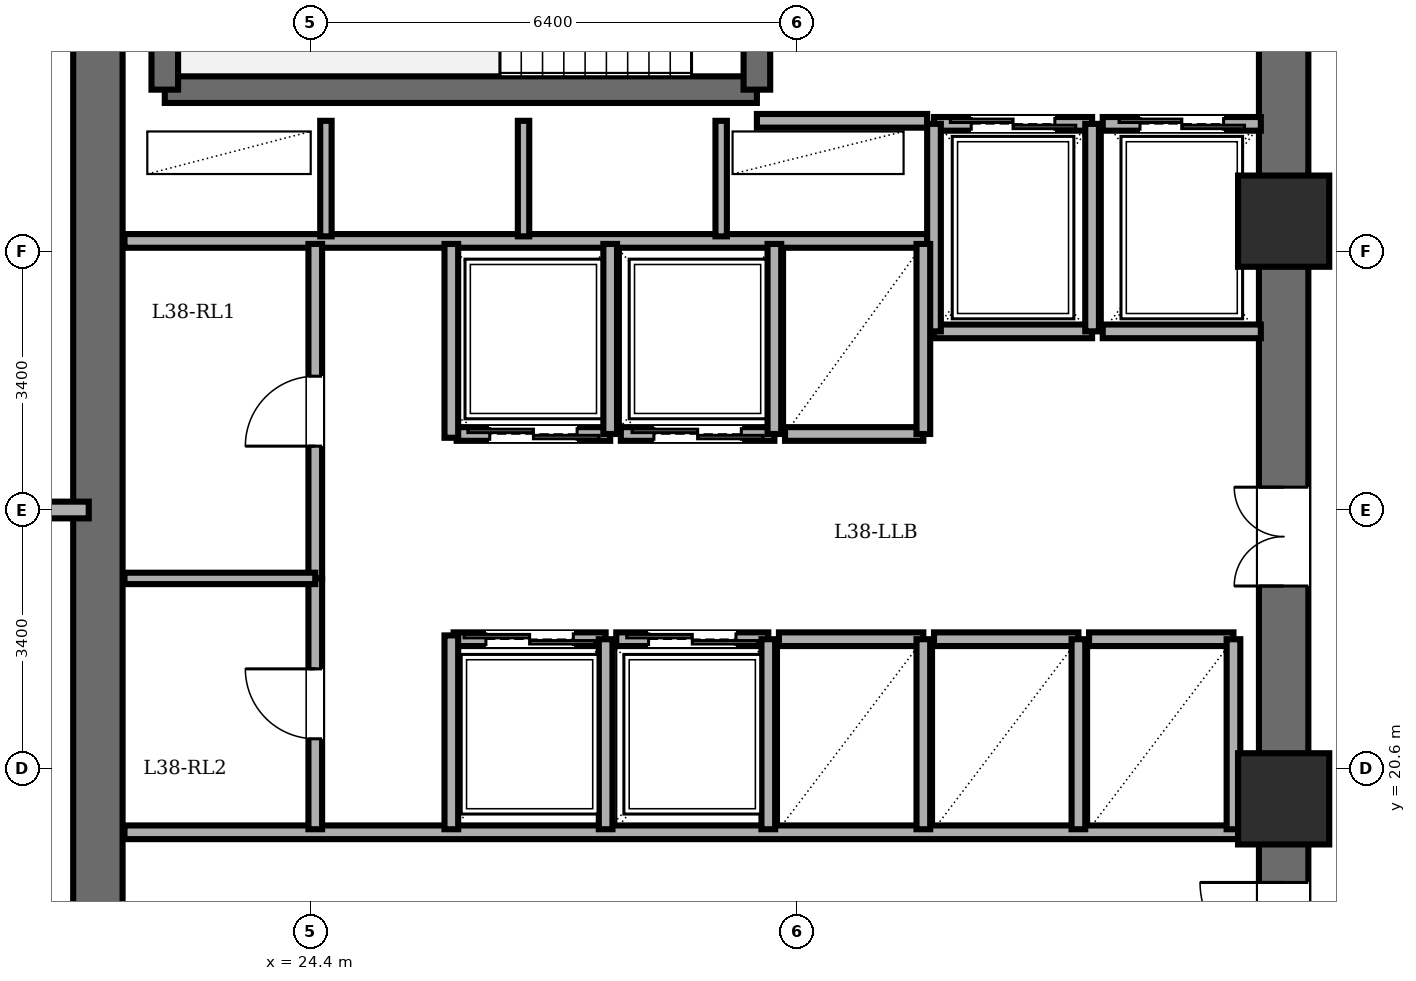
"""IFC4 building model, lengths in metres.
Left out: names, types, materials, properties, quantities, classifications, styles, units other than length and angle.
Written with IfcOpenShell. Run it as: python <this file> out.ifc"""

import sys

from ifc_helpers import new_model, si_unit, direction, frame, frame_2d, origin, origin_2d, place, context, subcontext, project, spatial, rectangle, extrude, element, fill, save


model = new_model("IFC4")
c1 = context("Model", 3, precision=1e-05, world=origin(), true_north=direction((0.0, 1.0)))
c2 = subcontext(c1, "Body", "Model", "MODEL_VIEW")
j1 = project(units=[si_unit("LENGTHUNIT", "METRE"), si_unit("PLANEANGLEUNIT", "RADIAN")], contexts=[c1])
p1 = place(None, origin())
s1 = spatial("IfcSite", under=j1, at=p1, CompositionType="ELEMENT")
p2 = place(p1, origin())
s2 = spatial("IfcBuilding", under=s1, at=p2, CompositionType="ELEMENT")
p3 = place(p2, frame((0.0, 0.0, 147.4)))
s3 = spatial("IfcBuildingStorey", under=s2, at=p3, CompositionType="ELEMENT", Elevation=147.4)
for number, where, z_axis, x_axis in (
    (1, (37.2, 20.2, 0.0), (0.0, 0.0, 1.0), (1.0, 0.0, 0.0)),
    (2, (37.2, 27.8, 0.0), (0.0, 0.0, 1.0), (1.0, 0.0, 0.0)),
):
    element("IfcColumn", number, at=place(p3, frame(where, z_axis=z_axis, x_axis=x_axis)), inside=s3, PredefinedType="COLUMN", context=c2, shape_type="SweptSolid", body=[
        extrude(rectangle(XDim=1.2, YDim=1.2, at=origin_2d()), origin(), (0.0, 0.0, 1.0), 3.6),
    ])
p4 = place(p3, frame((21.6, 14.4, 0.0), z_axis=(0.0, 0.0, 1.0), x_axis=(0.0, 1.0, 0.0)))
e3 = element("IfcWall", 3, at=p4, inside=s3, PredefinedType="SHEAR", context=c2, shape_type="SweptSolid", body=[
    extrude(rectangle(XDim=19.2, YDim=0.65, at=frame_2d((9.6, 0.0))), origin(), (0.0, 0.0, 1.0), 3.4),
])
p5 = place(p3, frame((37.2, 14.4, 0.0), z_axis=(0.0, 0.0, 1.0), x_axis=(0.0, 1.0, 0.0)))
e4 = element("IfcWall", 4, at=p5, inside=s3, PredefinedType="SHEAR", context=c2, shape_type="SweptSolid", body=[
    extrude(rectangle(XDim=19.2, YDim=0.65, at=frame_2d((9.6, 0.0))), origin(), (0.0, 0.0, 1.0), 3.4),
])
p6 = place(p5, frame((15.8, 0.0, 0.0)))
e5 = element("IfcOpeningElement", 5, at=p6, cuts=e4, PredefinedType="OPENING", context=c2, shape_type="SweptSolid", body=[
    extrude(rectangle(XDim=1.15, YDim=2.15, at=frame_2d((0.575, 1.075))), frame((0.0, 0.335, 0.0), z_axis=(0.0, -1.0, 0.0), x_axis=(1.0, 0.0, 0.0)), (0.0, 0.0, 1.0), 0.67),
])
p7 = place(p5, frame((3.6, 0.0, 0.0)))
e6 = element("IfcOpeningElement", 6, at=p7, cuts=e4, PredefinedType="OPENING", context=c2, shape_type="SweptSolid", body=[
    extrude(rectangle(XDim=1.1, YDim=2.15, at=frame_2d((0.55, 1.075))), frame((0.0, 0.335, 0.0), z_axis=(0.0, -1.0, 0.0), x_axis=(1.0, 0.0, 0.0)), (0.0, 0.0, 1.0), 0.67),
])
p8 = place(p5, frame((8.6, 0.0, 0.0)))
e7 = element("IfcOpeningElement", 7, at=p8, cuts=e4, PredefinedType="OPENING", context=c2, shape_type="SweptSolid", body=[
    extrude(rectangle(XDim=1.3, YDim=2.2, at=frame_2d((0.65, 1.1))), frame((0.0, 0.335, 0.0), z_axis=(0.0, -1.0, 0.0), x_axis=(1.0, 0.0, 0.0)), (0.0, 0.0, 1.0), 0.67),
])
p9 = place(p3, frame((22.48, 29.53, 0.0), z_axis=(0.0, 0.0, 1.0), x_axis=(1.0, 0.0, 0.0)))
e8 = element("IfcWall", 8, at=p9, inside=s3, PredefinedType="SOLIDWALL", context=c2, shape_type="SweptSolid", body=[
    extrude(rectangle(XDim=7.79, YDim=0.35, at=frame_2d((3.895, 0.0))), origin(), (0.0, 0.0, 1.0), 3.4),
])
p10 = place(p3, frame((22.48, 29.53, 0.0), z_axis=(0.0, 0.0, 1.0), x_axis=(0.0, 1.0, 0.0)))
e9 = element("IfcWall", 9, at=p10, inside=s3, PredefinedType="SOLIDWALL", context=c2, shape_type="SweptSolid", body=[
    extrude(rectangle(XDim=3.58, YDim=0.35, at=frame_2d((1.79, 0.0))), origin(), (0.0, 0.0, 1.0), 3.4),
])
p11 = place(p3, frame((30.27, 29.53, 0.0), z_axis=(0.0, 0.0, 1.0), x_axis=(0.0, 1.0, 0.0)))
e10 = element("IfcWall", 10, at=p11, inside=s3, PredefinedType="SOLIDWALL", context=c2, shape_type="SweptSolid", body=[
    extrude(rectangle(XDim=3.58, YDim=0.35, at=frame_2d((1.79, 0.0))), origin(), (0.0, 0.0, 1.0), 3.4),
])
p12 = place(p11, frame((1.25, 0.0, 0.0)))
e11 = element("IfcOpeningElement", 11, at=p12, cuts=e10, PredefinedType="OPENING", context=c2, shape_type="SweptSolid", body=[
    extrude(rectangle(XDim=1.1, YDim=2.15, at=frame_2d((0.55, 1.075))), frame((0.0, 0.185, 0.0), z_axis=(0.0, -1.0, 0.0), x_axis=(1.0, 0.0, 0.0)), (0.0, 0.0, 1.0), 0.37),
])
p13 = place(p3, frame((30.27, 29.12, 0.0), z_axis=(0.0, 0.0, 1.0), x_axis=(1.0, 0.0, 0.0)))
e12 = element("IfcWall", 12, at=p13, inside=s3, PredefinedType="PARTITIONING", context=c2, shape_type="SweptSolid", body=[
    extrude(rectangle(XDim=2.24, YDim=0.18, at=frame_2d((1.12, 0.0))), origin(), (0.0, 0.0, 1.0), 3.4),
])
p14 = place(p3, frame((21.95, 27.54, 0.0), z_axis=(0.0, 0.0, 1.0), x_axis=(1.0, 0.0, 0.0)))
e13 = element("IfcWall", 13, at=p14, inside=s3, PredefinedType="PARTITIONING", context=c2, shape_type="SweptSolid", body=[
    extrude(rectangle(XDim=10.56, YDim=0.18, at=frame_2d((5.28, 0.0))), origin(), (0.0, 0.0, 1.0), 3.4),
])
for number, where, z_axis, x_axis in (
    (14, (24.6, 27.6, 0.0), (0.0, 0.0, 1.0), (0.0, 1.0, 0.0)),
    (15, (27.2, 27.6, 0.0), (0.0, 0.0, 1.0), (0.0, 1.0, 0.0)),
    (16, (29.8, 27.6, 0.0), (0.0, 0.0, 1.0), (0.0, 1.0, 0.0)),
):
    element("IfcWall", number, at=place(p3, frame(where, z_axis=z_axis, x_axis=x_axis)), inside=s3, PredefinedType="PARTITIONING", context=c2, shape_type="SweptSolid", body=[
        extrude(rectangle(XDim=1.52, YDim=0.15, at=frame_2d((0.76, 0.0))), origin(), (0.0, 0.0, 1.0), 3.4),
    ])
p15 = place(p3, frame((21.95, 19.76, 0.0), z_axis=(0.0, 0.0, 1.0), x_axis=(1.0, 0.0, 0.0)))
e17 = element("IfcWall", 17, at=p15, inside=s3, PredefinedType="PARTITIONING", context=c2, shape_type="SweptSolid", body=[
    extrude(rectangle(XDim=14.87, YDim=0.18, at=frame_2d((7.435, 0.0))), origin(), (0.0, 0.0, 1.0), 3.4),
])
p16 = place(p3, frame((32.6, 29.08, 0.0), z_axis=(0.0, 0.0, 1.0), x_axis=(1.0, 0.0, 0.0)))
e18 = element("IfcWall", 18, at=p16, inside=s3, PredefinedType="PARTITIONING", context=c2, shape_type="SweptSolid", body=[
    extrude(rectangle(XDim=2.08, YDim=0.18, at=frame_2d((1.04, 0.0))), origin(), (0.0, 0.0, 1.0), 3.4),
])
p17 = place(p16, frame((0.49, 0.0, 0.0)))
e19 = element("IfcOpeningElement", 19, at=p17, cuts=e18, PredefinedType="OPENING", context=c2, shape_type="SweptSolid", body=[
    extrude(rectangle(XDim=1.1, YDim=2.2, at=frame_2d((0.55, 1.1))), frame((0.0, 0.1, 0.0), z_axis=(0.0, -1.0, 0.0), x_axis=(1.0, 0.0, 0.0)), (0.0, 0.0, 1.0), 0.2),
])
p18 = place(p3, frame((34.68, 26.35, 0.0), z_axis=(0.0, 0.0, 1.0), x_axis=(-1.0, 0.0, 0.0)))
e20 = element("IfcWall", 20, at=p18, inside=s3, PredefinedType="PARTITIONING", context=c2, shape_type="SweptSolid", body=[
    extrude(rectangle(XDim=2.08, YDim=0.18, at=frame_2d((1.04, 0.0))), origin(), (0.0, 0.0, 1.0), 3.4),
])
for number, where, z_axis, x_axis in (
    (21, (34.68, 26.35, 0.0), (0.0, 0.0, 1.0), (0.0, 1.0, 0.0)),
    (22, (32.6, 29.08, 0.0), (0.0, 0.0, 1.0), (0.0, -1.0, 0.0)),
):
    element("IfcWall", number, at=place(p3, frame(where, z_axis=z_axis, x_axis=x_axis)), inside=s3, PredefinedType="PARTITIONING", context=c2, shape_type="SweptSolid", body=[
        extrude(rectangle(XDim=2.73, YDim=0.18, at=frame_2d((1.365, 0.0))), origin(), (0.0, 0.0, 1.0), 3.4),
    ])
p19 = place(p3, frame((34.82, 29.08, 0.0), z_axis=(0.0, 0.0, 1.0), x_axis=(1.0, 0.0, 0.0)))
e23 = element("IfcWall", 23, at=p19, inside=s3, PredefinedType="PARTITIONING", context=c2, shape_type="SweptSolid", body=[
    extrude(rectangle(XDim=2.08, YDim=0.18, at=frame_2d((1.04, 0.0))), origin(), (0.0, 0.0, 1.0), 3.4),
])
p20 = place(p19, frame((0.49, 0.0, 0.0)))
e24 = element("IfcOpeningElement", 24, at=p20, cuts=e23, PredefinedType="OPENING", context=c2, shape_type="SweptSolid", body=[
    extrude(rectangle(XDim=1.1, YDim=2.2, at=frame_2d((0.55, 1.1))), frame((0.0, 0.1, 0.0), z_axis=(0.0, -1.0, 0.0), x_axis=(1.0, 0.0, 0.0)), (0.0, 0.0, 1.0), 0.2),
])
p21 = place(p3, frame((36.9, 26.35, 0.0), z_axis=(0.0, 0.0, 1.0), x_axis=(-1.0, 0.0, 0.0)))
e25 = element("IfcWall", 25, at=p21, inside=s3, PredefinedType="PARTITIONING", context=c2, shape_type="SweptSolid", body=[
    extrude(rectangle(XDim=2.08, YDim=0.18, at=frame_2d((1.04, 0.0))), origin(), (0.0, 0.0, 1.0), 3.4),
])
p22 = place(p3, frame((28.34, 25.0, 0.0), z_axis=(0.0, 0.0, 1.0), x_axis=(-1.0, 0.0, 0.0)))
e26 = element("IfcWall", 26, at=p22, inside=s3, PredefinedType="PARTITIONING", context=c2, shape_type="SweptSolid", body=[
    extrude(rectangle(XDim=2.02, YDim=0.18, at=frame_2d((1.01, 0.0))), origin(), (0.0, 0.0, 1.0), 3.4),
])
p23 = place(p22, frame((0.435, 0.0, 0.0)))
e27 = element("IfcOpeningElement", 27, at=p23, cuts=e26, PredefinedType="OPENING", context=c2, shape_type="SweptSolid", body=[
    extrude(rectangle(XDim=1.15, YDim=2.2, at=frame_2d((0.575, 1.1))), frame((0.0, 0.1, 0.0), z_axis=(0.0, -1.0, 0.0), x_axis=(1.0, 0.0, 0.0)), (0.0, 0.0, 1.0), 0.2),
])
p24 = place(p3, frame((28.34, 25.0, 0.0), z_axis=(0.0, 0.0, 1.0), x_axis=(0.0, 1.0, 0.0)))
e28 = element("IfcWall", 28, at=p24, inside=s3, PredefinedType="PARTITIONING", context=c2, shape_type="SweptSolid", body=[
    extrude(rectangle(XDim=2.5, YDim=0.18, at=frame_2d((1.25, 0.0))), origin(), (0.0, 0.0, 1.0), 3.4),
])
p25 = place(p3, frame((30.5, 25.0, 0.0), z_axis=(0.0, 0.0, 1.0), x_axis=(-1.0, 0.0, 0.0)))
e29 = element("IfcWall", 29, at=p25, inside=s3, PredefinedType="PARTITIONING", context=c2, shape_type="SweptSolid", body=[
    extrude(rectangle(XDim=2.02, YDim=0.18, at=frame_2d((1.01, 0.0))), origin(), (0.0, 0.0, 1.0), 3.4),
])
p26 = place(p25, frame((0.435, 0.0, 0.0)))
e30 = element("IfcOpeningElement", 30, at=p26, cuts=e29, PredefinedType="OPENING", context=c2, shape_type="SweptSolid", body=[
    extrude(rectangle(XDim=1.15, YDim=2.2, at=frame_2d((0.575, 1.1))), frame((0.0, 0.1, 0.0), z_axis=(0.0, -1.0, 0.0), x_axis=(1.0, 0.0, 0.0)), (0.0, 0.0, 1.0), 0.2),
])
p27 = place(p3, frame((30.5, 25.0, 0.0), z_axis=(0.0, 0.0, 1.0), x_axis=(0.0, 1.0, 0.0)))
e31 = element("IfcWall", 31, at=p27, inside=s3, PredefinedType="PARTITIONING", context=c2, shape_type="SweptSolid", body=[
    extrude(rectangle(XDim=2.5, YDim=0.18, at=frame_2d((1.25, 0.0))), origin(), (0.0, 0.0, 1.0), 3.4),
])
p28 = place(p3, frame((26.28, 22.3, 0.0), z_axis=(0.0, 0.0, 1.0), x_axis=(1.0, 0.0, 0.0)))
e32 = element("IfcWall", 32, at=p28, inside=s3, PredefinedType="PARTITIONING", context=c2, shape_type="SweptSolid", body=[
    extrude(rectangle(XDim=2.0, YDim=0.18, at=frame_2d((1.0, 0.0))), origin(), (0.0, 0.0, 1.0), 3.4),
])
p29 = place(p28, frame((0.425, 0.0, 0.0)))
e33 = element("IfcOpeningElement", 33, at=p29, cuts=e32, PredefinedType="OPENING", context=c2, shape_type="SweptSolid", body=[
    extrude(rectangle(XDim=1.15, YDim=2.2, at=frame_2d((0.575, 1.1))), frame((0.0, 0.1, 0.0), z_axis=(0.0, -1.0, 0.0), x_axis=(1.0, 0.0, 0.0)), (0.0, 0.0, 1.0), 0.2),
])
p30 = place(p3, frame((28.28, 19.8, 0.0), z_axis=(0.0, 0.0, 1.0), x_axis=(0.0, 1.0, 0.0)))
e34 = element("IfcWall", 34, at=p30, inside=s3, PredefinedType="PARTITIONING", context=c2, shape_type="SweptSolid", body=[
    extrude(rectangle(XDim=2.5, YDim=0.18, at=frame_2d((1.25, 0.0))), origin(), (0.0, 0.0, 1.0), 3.4),
])
p31 = place(p3, frame((28.42, 22.3, 0.0), z_axis=(0.0, 0.0, 1.0), x_axis=(1.0, 0.0, 0.0)))
e35 = element("IfcWall", 35, at=p31, inside=s3, PredefinedType="PARTITIONING", context=c2, shape_type="SweptSolid", body=[
    extrude(rectangle(XDim=2.0, YDim=0.18, at=frame_2d((1.0, 0.0))), origin(), (0.0, 0.0, 1.0), 3.4),
])
p32 = place(p31, frame((0.425, 0.0, 0.0)))
e36 = element("IfcOpeningElement", 36, at=p32, cuts=e35, PredefinedType="OPENING", context=c2, shape_type="SweptSolid", body=[
    extrude(rectangle(XDim=1.15, YDim=2.2, at=frame_2d((0.575, 1.1))), frame((0.0, 0.1, 0.0), z_axis=(0.0, -1.0, 0.0), x_axis=(1.0, 0.0, 0.0)), (0.0, 0.0, 1.0), 0.2),
])
p33 = place(p3, frame((30.42, 19.8, 0.0), z_axis=(0.0, 0.0, 1.0), x_axis=(0.0, 1.0, 0.0)))
e37 = element("IfcWall", 37, at=p33, inside=s3, PredefinedType="PARTITIONING", context=c2, shape_type="SweptSolid", body=[
    extrude(rectangle(XDim=2.5, YDim=0.18, at=frame_2d((1.25, 0.0))), origin(), (0.0, 0.0, 1.0), 3.4),
])
p34 = place(p3, frame((32.46, 25.0, 0.0), z_axis=(0.0, 0.0, 1.0), x_axis=(-1.0, 0.0, 0.0)))
e38 = element("IfcWall", 38, at=p34, inside=s3, PredefinedType="PARTITIONING", context=c2, shape_type="SweptSolid", body=[
    extrude(rectangle(XDim=1.82, YDim=0.18, at=frame_2d((0.91, 0.0))), origin(), (0.0, 0.0, 1.0), 3.4),
])
p35 = place(p3, frame((32.46, 25.0, 0.0), z_axis=(0.0, 0.0, 1.0), x_axis=(0.0, 1.0, 0.0)))
e39 = element("IfcWall", 39, at=p35, inside=s3, PredefinedType="PARTITIONING", context=c2, shape_type="SweptSolid", body=[
    extrude(rectangle(XDim=2.5, YDim=0.18, at=frame_2d((1.25, 0.0))), origin(), (0.0, 0.0, 1.0), 3.4),
])
p36 = place(p3, frame((30.56, 22.3, 0.0), z_axis=(0.0, 0.0, 1.0), x_axis=(1.0, 0.0, 0.0)))
e40 = element("IfcWall", 40, at=p36, inside=s3, PredefinedType="PARTITIONING", context=c2, shape_type="SweptSolid", body=[
    extrude(rectangle(XDim=1.9, YDim=0.18, at=frame_2d((0.95, 0.0))), origin(), (0.0, 0.0, 1.0), 3.4),
])
p37 = place(p3, frame((32.46, 19.8, 0.0), z_axis=(0.0, 0.0, 1.0), x_axis=(0.0, 1.0, 0.0)))
e41 = element("IfcWall", 41, at=p37, inside=s3, PredefinedType="PARTITIONING", context=c2, shape_type="SweptSolid", body=[
    extrude(rectangle(XDim=2.5, YDim=0.18, at=frame_2d((1.25, 0.0))), origin(), (0.0, 0.0, 1.0), 3.4),
])
p38 = place(p3, frame((32.6, 22.3, 0.0), z_axis=(0.0, 0.0, 1.0), x_axis=(1.0, 0.0, 0.0)))
e42 = element("IfcWall", 42, at=p38, inside=s3, PredefinedType="PARTITIONING", context=c2, shape_type="SweptSolid", body=[
    extrude(rectangle(XDim=1.9, YDim=0.18, at=frame_2d((0.95, 0.0))), origin(), (0.0, 0.0, 1.0), 3.4),
])
p39 = place(p3, frame((34.5, 19.8, 0.0), z_axis=(0.0, 0.0, 1.0), x_axis=(0.0, 1.0, 0.0)))
e43 = element("IfcWall", 43, at=p39, inside=s3, PredefinedType="PARTITIONING", context=c2, shape_type="SweptSolid", body=[
    extrude(rectangle(XDim=2.5, YDim=0.18, at=frame_2d((1.25, 0.0))), origin(), (0.0, 0.0, 1.0), 3.4),
])
p40 = place(p3, frame((34.64, 22.3, 0.0), z_axis=(0.0, 0.0, 1.0), x_axis=(1.0, 0.0, 0.0)))
e44 = element("IfcWall", 44, at=p40, inside=s3, PredefinedType="PARTITIONING", context=c2, shape_type="SweptSolid", body=[
    extrude(rectangle(XDim=1.9, YDim=0.18, at=frame_2d((0.95, 0.0))), origin(), (0.0, 0.0, 1.0), 3.4),
])
p41 = place(p3, frame((36.54, 19.8, 0.0), z_axis=(0.0, 0.0, 1.0), x_axis=(0.0, 1.0, 0.0)))
e45 = element("IfcWall", 45, at=p41, inside=s3, PredefinedType="PARTITIONING", context=c2, shape_type="SweptSolid", body=[
    extrude(rectangle(XDim=2.5, YDim=0.18, at=frame_2d((1.25, 0.0))), origin(), (0.0, 0.0, 1.0), 3.4),
])
p42 = place(p3, frame((24.46, 23.1, 0.0), z_axis=(0.0, 0.0, 1.0), x_axis=(0.0, 1.0, 0.0)))
e46 = element("IfcWall", 46, at=p42, inside=s3, PredefinedType="PARTITIONING", context=c2, shape_type="SweptSolid", body=[
    extrude(rectangle(XDim=4.4, YDim=0.18, at=frame_2d((2.2, 0.0))), origin(), (0.0, 0.0, 1.0), 3.4),
])
p43 = place(p42, frame((1.74, 0.0, 0.0)))
e47 = element("IfcOpeningElement", 47, at=p43, cuts=e46, PredefinedType="OPENING", context=c2, shape_type="SweptSolid", body=[
    extrude(rectangle(XDim=0.92, YDim=2.1, at=frame_2d((0.46, 1.05))), frame((0.0, 0.1, 0.0), z_axis=(0.0, -1.0, 0.0), x_axis=(1.0, 0.0, 0.0)), (0.0, 0.0, 1.0), 0.2),
])
p44 = place(p3, frame((24.46, 19.8, 0.0), z_axis=(0.0, 0.0, 1.0), x_axis=(0.0, 1.0, 0.0)))
e48 = element("IfcWall", 48, at=p44, inside=s3, PredefinedType="PARTITIONING", context=c2, shape_type="SweptSolid", body=[
    extrude(rectangle(XDim=3.3, YDim=0.18, at=frame_2d((1.65, 0.0))), origin(), (0.0, 0.0, 1.0), 3.4),
])
p45 = place(p44, frame((1.19, 0.0, 0.0)))
e49 = element("IfcOpeningElement", 49, at=p45, cuts=e48, PredefinedType="OPENING", context=c2, shape_type="SweptSolid", body=[
    extrude(rectangle(XDim=0.92, YDim=2.1, at=frame_2d((0.46, 1.05))), frame((0.0, 0.1, 0.0), z_axis=(0.0, -1.0, 0.0), x_axis=(1.0, 0.0, 0.0)), (0.0, 0.0, 1.0), 0.2),
])
p46 = place(p3, frame((21.95, 23.1, 0.0), z_axis=(0.0, 0.0, 1.0), x_axis=(1.0, 0.0, 0.0)))
e50 = element("IfcWall", 50, at=p46, inside=s3, PredefinedType="PARTITIONING", context=c2, shape_type="SweptSolid", body=[
    extrude(rectangle(XDim=2.51, YDim=0.15, at=frame_2d((1.255, 0.0))), origin(), (0.0, 0.0, 1.0), 3.4),
])
for number, where, z_axis, x_axis in (
    (51, (26.25, 24.95, 0.0), (0.0, 0.0, 1.0), (0.0, 1.0, 0.0)),
    (52, (26.25, 19.8, 0.0), (0.0, 0.0, 1.0), (0.0, 1.0, 0.0)),
):
    element("IfcWall", number, at=place(p3, frame(where, z_axis=z_axis, x_axis=x_axis)), inside=s3, PredefinedType="PARTITIONING", context=c2, shape_type="SweptSolid", body=[
        extrude(rectangle(XDim=2.55, YDim=0.18, at=frame_2d((1.275, 0.0))), origin(), (0.0, 0.0, 1.0), 3.4),
    ])
p47 = place(p3, frame((13.8, 24.0, 0.0), z_axis=(0.0, 0.0, 1.0), x_axis=(1.0, 0.0, 0.0)))
e53 = element("IfcWall", 53, at=p47, inside=s3, PredefinedType="PARTITIONING", context=c2, shape_type="SweptSolid", body=[
    extrude(rectangle(XDim=7.68, YDim=0.22, at=frame_2d((3.84, 0.0))), origin(), (0.0, 0.0, 1.0), 3.4),
])
p48 = place(p7, origin())
e54 = element("IfcDoor", 54, at=p48, inside=s3, OperationType="SINGLE_SWING_RIGHT", PredefinedType="DOOR", context=c2, shape_type="SweptSolid", body=[
    extrude(rectangle(XDim=1.1, YDim=2.15, at=frame_2d((0.55, 1.075))), frame((0.0, 0.025, 0.0), z_axis=(0.0, -1.0, 0.0), x_axis=(1.0, 0.0, 0.0)), (0.0, 0.0, 1.0), 0.05),
])
fill(e6, e54)
p49 = place(p17, origin())
e55 = element("IfcDoor", 55, at=p49, inside=s3, OperationType="DOUBLE_DOOR_SLIDING", PredefinedType="DOOR", context=c2, shape_type="SweptSolid", body=[
    extrude(rectangle(XDim=1.1, YDim=2.2, at=frame_2d((0.55, 1.1))), frame((0.0, 0.025, 0.0), z_axis=(0.0, -1.0, 0.0), x_axis=(1.0, 0.0, 0.0)), (0.0, 0.0, 1.0), 0.05),
])
fill(e19, e55)
p50 = place(p20, origin())
e56 = element("IfcDoor", 56, at=p50, inside=s3, OperationType="DOUBLE_DOOR_SLIDING", PredefinedType="DOOR", context=c2, shape_type="SweptSolid", body=[
    extrude(rectangle(XDim=1.1, YDim=2.2, at=frame_2d((0.55, 1.1))), frame((0.0, 0.025, 0.0), z_axis=(0.0, -1.0, 0.0), x_axis=(1.0, 0.0, 0.0)), (0.0, 0.0, 1.0), 0.05),
])
fill(e24, e56)
p51 = place(p23, origin())
e57 = element("IfcDoor", 57, at=p51, inside=s3, OperationType="DOUBLE_DOOR_SLIDING", PredefinedType="DOOR", context=c2, shape_type="SweptSolid", body=[
    extrude(rectangle(XDim=1.15, YDim=2.2, at=frame_2d((0.575, 1.1))), frame((0.0, 0.025, 0.0), z_axis=(0.0, -1.0, 0.0), x_axis=(1.0, 0.0, 0.0)), (0.0, 0.0, 1.0), 0.05),
])
fill(e27, e57)
p52 = place(p26, origin())
e58 = element("IfcDoor", 58, at=p52, inside=s3, OperationType="DOUBLE_DOOR_SLIDING", PredefinedType="DOOR", context=c2, shape_type="SweptSolid", body=[
    extrude(rectangle(XDim=1.15, YDim=2.2, at=frame_2d((0.575, 1.1))), frame((0.0, 0.025, 0.0), z_axis=(0.0, -1.0, 0.0), x_axis=(1.0, 0.0, 0.0)), (0.0, 0.0, 1.0), 0.05),
])
fill(e30, e58)
p53 = place(p29, origin())
e59 = element("IfcDoor", 59, at=p53, inside=s3, OperationType="DOUBLE_DOOR_SLIDING", PredefinedType="DOOR", context=c2, shape_type="SweptSolid", body=[
    extrude(rectangle(XDim=1.15, YDim=2.2, at=frame_2d((0.575, 1.1))), frame((0.0, 0.025, 0.0), z_axis=(0.0, -1.0, 0.0), x_axis=(1.0, 0.0, 0.0)), (0.0, 0.0, 1.0), 0.05),
])
fill(e33, e59)
p54 = place(p32, origin())
e60 = element("IfcDoor", 60, at=p54, inside=s3, OperationType="DOUBLE_DOOR_SLIDING", PredefinedType="DOOR", context=c2, shape_type="SweptSolid", body=[
    extrude(rectangle(XDim=1.15, YDim=2.2, at=frame_2d((0.575, 1.1))), frame((0.0, 0.025, 0.0), z_axis=(0.0, -1.0, 0.0), x_axis=(1.0, 0.0, 0.0)), (0.0, 0.0, 1.0), 0.05),
])
fill(e36, e60)
p55 = place(p43, origin())
e61 = element("IfcDoor", 61, at=p55, inside=s3, OperationType="SINGLE_SWING_LEFT", PredefinedType="DOOR", context=c2, shape_type="SweptSolid", body=[
    extrude(rectangle(XDim=0.92, YDim=2.1, at=frame_2d((0.46, 1.05))), frame((0.0, 0.025, 0.0), z_axis=(0.0, -1.0, 0.0), x_axis=(1.0, 0.0, 0.0)), (0.0, 0.0, 1.0), 0.05),
])
fill(e47, e61)
p56 = place(p45, origin())
e62 = element("IfcDoor", 62, at=p56, inside=s3, OperationType="SINGLE_SWING_RIGHT", PredefinedType="DOOR", context=c2, shape_type="SweptSolid", body=[
    extrude(rectangle(XDim=0.92, YDim=2.1, at=frame_2d((0.46, 1.05))), frame((0.0, 0.025, 0.0), z_axis=(0.0, -1.0, 0.0), x_axis=(1.0, 0.0, 0.0)), (0.0, 0.0, 1.0), 0.05),
])
fill(e49, e62)
p57 = place(p8, origin())
e63 = element("IfcDoor", 63, at=p57, inside=s3, OperationType="DOUBLE_DOOR_SINGLE_SWING", PredefinedType="DOOR", context=c2, shape_type="SweptSolid", body=[
    extrude(rectangle(XDim=1.3, YDim=2.2, at=frame_2d((0.65, 1.1))), frame((0.0, 0.025, 0.0), z_axis=(0.0, -1.0, 0.0), x_axis=(1.0, 0.0, 0.0)), (0.0, 0.0, 1.0), 0.05),
])
fill(e7, e63)
save(model, sys.argv[1])
